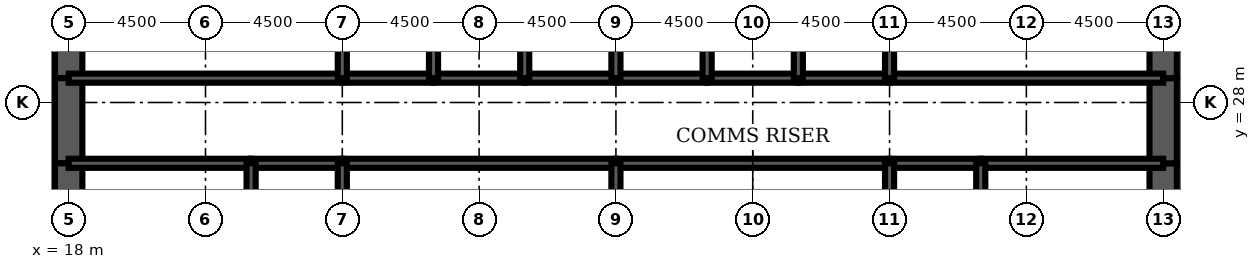
"""IFC4 building model, lengths in metres.
Left out: names, types, materials, properties, quantities, classifications, styles, units other than length and angle.
Written with IfcOpenShell. Run it as: python <this file> out.ifc"""

import sys

from ifc_helpers import new_model, si_unit, direction, frame, frame_2d, origin, place, context, subcontext, project, spatial, rectangle, extrude, element, fill, save


model = new_model("IFC4")
c1 = context("Model", 3, precision=1e-05, world=origin(), true_north=direction((0.0, 1.0)))
c2 = subcontext(c1, "Body", "Model", "MODEL_VIEW")
j1 = project(units=[si_unit("LENGTHUNIT", "METRE"), si_unit("PLANEANGLEUNIT", "RADIAN")], contexts=[c1])
p1 = place(None, origin())
s1 = spatial("IfcSite", under=j1, at=p1, CompositionType="ELEMENT")
p2 = place(p1, origin())
s2 = spatial("IfcBuilding", under=s1, at=p2, CompositionType="ELEMENT")
p3 = place(p2, frame((0.0, 0.0, 138.3)))
s3 = spatial("IfcBuildingStorey", under=s2, at=p3, CompositionType="ELEMENT", Elevation=138.3)
p4 = place(p3, frame((18.0, 32.0, 0.0), z_axis=(0.0, 0.0, 1.0), x_axis=(0.0, -1.0, 0.0)))
e1 = element("IfcWall", 1, at=p4, inside=s3, PredefinedType="SHEAR", context=c2, shape_type="SweptSolid", body=[
    extrude(rectangle(XDim=3.2, YDim=0.9, at=frame_2d((1.6, 0.0))), origin(), (0.0, 0.0, 1.0), 4.2),
])
p5 = place(p3, frame((18.0, 28.8, 0.0), z_axis=(0.0, 0.0, 1.0), x_axis=(0.0, -1.0, 0.0)))
e2 = element("IfcWall", 2, at=p5, inside=s3, PredefinedType="SHEAR", context=c2, shape_type="SweptSolid", body=[
    extrude(rectangle(XDim=2.8, YDim=0.9, at=frame_2d((1.4, 0.0))), origin(), (0.0, 0.0, 1.0), 4.2),
])
p6 = place(p5, frame((0.4, 0.0, 0.0)))
e3 = element("IfcOpeningElement", 3, at=p6, cuts=e2, PredefinedType="OPENING", context=c2, shape_type="SweptSolid", body=[
    extrude(rectangle(XDim=1.8, YDim=2.1, at=frame_2d((0.9, 1.05))), frame((0.0, 0.46, 0.0), z_axis=(0.0, -1.0, 0.0), x_axis=(1.0, 0.0, 0.0)), (0.0, 0.0, 1.0), 0.92),
])
for number, where, z_axis, x_axis in (
    (4, (18.0, 26.0, 0.0), (0.0, 0.0, 1.0), (0.0, -1.0, 0.0)),
    (5, (54.0, 22.0, 0.0), (0.0, 0.0, 1.0), (0.0, 1.0, 0.0)),
):
    element("IfcWall", number, at=place(p3, frame(where, z_axis=z_axis, x_axis=x_axis)), inside=s3, PredefinedType="SHEAR", context=c2, shape_type="SweptSolid", body=[
        extrude(rectangle(XDim=4.0, YDim=0.9, at=frame_2d((2.0, 0.0))), origin(), (0.0, 0.0, 1.0), 4.2),
    ])
p7 = place(p3, frame((54.0, 26.0, 0.0), z_axis=(0.0, 0.0, 1.0), x_axis=(0.0, 1.0, 0.0)))
e6 = element("IfcWall", 6, at=p7, inside=s3, PredefinedType="SHEAR", context=c2, shape_type="SweptSolid", body=[
    extrude(rectangle(XDim=2.8, YDim=0.9, at=frame_2d((1.4, 0.0))), origin(), (0.0, 0.0, 1.0), 4.2),
])
p8 = place(p7, frame((0.6, 0.0, 0.0)))
e7 = element("IfcOpeningElement", 7, at=p8, cuts=e6, PredefinedType="OPENING", context=c2, shape_type="SweptSolid", body=[
    extrude(rectangle(XDim=1.8, YDim=2.1, at=frame_2d((0.9, 1.05))), frame((0.0, 0.46, 0.0), z_axis=(0.0, -1.0, 0.0), x_axis=(1.0, 0.0, 0.0)), (0.0, 0.0, 1.0), 0.92),
])
p9 = place(p3, frame((54.0, 28.8, 0.0), z_axis=(0.0, 0.0, 1.0), x_axis=(0.0, 1.0, 0.0)))
e8 = element("IfcWall", 8, at=p9, inside=s3, PredefinedType="SHEAR", context=c2, shape_type="SweptSolid", body=[
    extrude(rectangle(XDim=3.2, YDim=0.9, at=frame_2d((1.6, 0.0))), origin(), (0.0, 0.0, 1.0), 4.2),
])
p10 = place(p3, frame((18.0, 28.8, 0.0), z_axis=(0.0, 0.0, 1.0), x_axis=(1.0, 0.0, 0.0)))
e9 = element("IfcWall", 9, at=p10, inside=s3, PredefinedType="SOLIDWALL", context=c2, shape_type="SweptSolid", body=[
    extrude(rectangle(XDim=9.0, YDim=0.3, at=frame_2d((4.5, 0.0))), origin(), (0.0, 0.0, 1.0), 4.2),
])
p11 = place(p10, frame((0.65, 0.0, 0.0)))
e10 = element("IfcOpeningElement", 10, at=p11, cuts=e9, PredefinedType="OPENING", context=c2, shape_type="SweptSolid", body=[
    extrude(rectangle(XDim=1.0, YDim=2.1, at=frame_2d((0.5, 1.05))), frame((0.0, 0.16, 0.0), z_axis=(0.0, -1.0, 0.0), x_axis=(1.0, 0.0, 0.0)), (0.0, 0.0, 1.0), 0.32),
])
p12 = place(p3, frame((27.0, 28.8, 0.0), z_axis=(0.0, 0.0, 1.0), x_axis=(1.0, 0.0, 0.0)))
e11 = element("IfcWall", 11, at=p12, inside=s3, PredefinedType="SOLIDWALL", context=c2, shape_type="SweptSolid", body=[
    extrude(rectangle(XDim=3.0, YDim=0.3, at=frame_2d((1.5, 0.0))), origin(), (0.0, 0.0, 1.0), 4.2),
])
p13 = place(p12, frame((0.95, 0.0, 0.0)))
e12 = element("IfcOpeningElement", 12, at=p13, cuts=e11, PredefinedType="OPENING", context=c2, shape_type="SweptSolid", body=[
    extrude(rectangle(XDim=1.1, YDim=2.2, at=frame_2d((0.55, 1.1))), frame((0.0, 0.16, 0.0), z_axis=(0.0, -1.0, 0.0), x_axis=(1.0, 0.0, 0.0)), (0.0, 0.0, 1.0), 0.32),
])
p14 = place(p3, frame((30.0, 28.8, 0.0), z_axis=(0.0, 0.0, 1.0), x_axis=(1.0, 0.0, 0.0)))
e13 = element("IfcWall", 13, at=p14, inside=s3, PredefinedType="SOLIDWALL", context=c2, shape_type="SweptSolid", body=[
    extrude(rectangle(XDim=3.0, YDim=0.3, at=frame_2d((1.5, 0.0))), origin(), (0.0, 0.0, 1.0), 4.2),
])
p15 = place(p14, frame((0.95, 0.0, 0.0)))
e14 = element("IfcOpeningElement", 14, at=p15, cuts=e13, PredefinedType="OPENING", context=c2, shape_type="SweptSolid", body=[
    extrude(rectangle(XDim=1.1, YDim=2.2, at=frame_2d((0.55, 1.1))), frame((0.0, 0.16, 0.0), z_axis=(0.0, -1.0, 0.0), x_axis=(1.0, 0.0, 0.0)), (0.0, 0.0, 1.0), 0.32),
])
p16 = place(p3, frame((33.0, 28.8, 0.0), z_axis=(0.0, 0.0, 1.0), x_axis=(1.0, 0.0, 0.0)))
e15 = element("IfcWall", 15, at=p16, inside=s3, PredefinedType="SOLIDWALL", context=c2, shape_type="SweptSolid", body=[
    extrude(rectangle(XDim=3.0, YDim=0.3, at=frame_2d((1.5, 0.0))), origin(), (0.0, 0.0, 1.0), 4.2),
])
p17 = place(p16, frame((0.95, 0.0, 0.0)))
e16 = element("IfcOpeningElement", 16, at=p17, cuts=e15, PredefinedType="OPENING", context=c2, shape_type="SweptSolid", body=[
    extrude(rectangle(XDim=1.1, YDim=2.2, at=frame_2d((0.55, 1.1))), frame((0.0, 0.16, 0.0), z_axis=(0.0, -1.0, 0.0), x_axis=(1.0, 0.0, 0.0)), (0.0, 0.0, 1.0), 0.32),
])
for number, where, z_axis, x_axis in (
    (17, (36.0, 28.8, 0.0), (0.0, 0.0, 1.0), (1.0, 0.0, 0.0)),
    (18, (39.0, 28.8, 0.0), (0.0, 0.0, 1.0), (1.0, 0.0, 0.0)),
):
    element("IfcWall", number, at=place(p3, frame(where, z_axis=z_axis, x_axis=x_axis)), inside=s3, PredefinedType="SOLIDWALL", context=c2, shape_type="SweptSolid", body=[
        extrude(rectangle(XDim=3.0, YDim=0.3, at=frame_2d((1.5, 0.0))), origin(), (0.0, 0.0, 1.0), 4.2),
    ])
p18 = place(p3, frame((42.0, 28.8, 0.0), z_axis=(0.0, 0.0, 1.0), x_axis=(1.0, 0.0, 0.0)))
e19 = element("IfcWall", 19, at=p18, inside=s3, PredefinedType="SOLIDWALL", context=c2, shape_type="SweptSolid", body=[
    extrude(rectangle(XDim=3.0, YDim=0.3, at=frame_2d((1.5, 0.0))), origin(), (0.0, 0.0, 1.0), 4.2),
])
p19 = place(p18, frame((0.95, 0.0, 0.0)))
e20 = element("IfcOpeningElement", 20, at=p19, cuts=e19, PredefinedType="OPENING", context=c2, shape_type="SweptSolid", body=[
    extrude(rectangle(XDim=1.1, YDim=2.2, at=frame_2d((0.55, 1.1))), frame((0.0, 0.16, 0.0), z_axis=(0.0, -1.0, 0.0), x_axis=(1.0, 0.0, 0.0)), (0.0, 0.0, 1.0), 0.32),
])
p20 = place(p3, frame((45.0, 28.8, 0.0), z_axis=(0.0, 0.0, 1.0), x_axis=(1.0, 0.0, 0.0)))
e21 = element("IfcWall", 21, at=p20, inside=s3, PredefinedType="SOLIDWALL", context=c2, shape_type="SweptSolid", body=[
    extrude(rectangle(XDim=9.0, YDim=0.3, at=frame_2d((4.5, 0.0))), origin(), (0.0, 0.0, 1.0), 4.2),
])
p21 = place(p20, frame((7.35, 0.0, 0.0)))
e22 = element("IfcOpeningElement", 22, at=p21, cuts=e21, PredefinedType="OPENING", context=c2, shape_type="SweptSolid", body=[
    extrude(rectangle(XDim=1.0, YDim=2.1, at=frame_2d((0.5, 1.05))), frame((0.0, 0.16, 0.0), z_axis=(0.0, -1.0, 0.0), x_axis=(1.0, 0.0, 0.0)), (0.0, 0.0, 1.0), 0.32),
])
p22 = place(p3, frame((18.0, 26.0, 0.0), z_axis=(0.0, 0.0, 1.0), x_axis=(1.0, 0.0, 0.0)))
e23 = element("IfcWall", 23, at=p22, inside=s3, PredefinedType="SOLIDWALL", context=c2, shape_type="SweptSolid", body=[
    extrude(rectangle(XDim=6.0, YDim=0.3, at=frame_2d((3.0, 0.0))), origin(), (0.0, 0.0, 1.0), 4.2),
])
p23 = place(p3, frame((24.0, 26.0, 0.0), z_axis=(0.0, 0.0, 1.0), x_axis=(1.0, 0.0, 0.0)))
e24 = element("IfcWall", 24, at=p23, inside=s3, PredefinedType="SOLIDWALL", context=c2, shape_type="SweptSolid", body=[
    extrude(rectangle(XDim=3.0, YDim=0.3, at=frame_2d((1.5, 0.0))), origin(), (0.0, 0.0, 1.0), 4.2),
])
for number, where, z_axis, x_axis in (
    (25, (27.0, 26.0, 0.0), (0.0, 0.0, 1.0), (1.0, 0.0, 0.0)),
    (26, (36.0, 26.0, 0.0), (0.0, 0.0, 1.0), (1.0, 0.0, 0.0)),
):
    element("IfcWall", number, at=place(p3, frame(where, z_axis=z_axis, x_axis=x_axis)), inside=s3, PredefinedType="SOLIDWALL", context=c2, shape_type="SweptSolid", body=[
        extrude(rectangle(XDim=9.0, YDim=0.3, at=frame_2d((4.5, 0.0))), origin(), (0.0, 0.0, 1.0), 4.2),
    ])
p24 = place(p3, frame((45.0, 26.0, 0.0), z_axis=(0.0, 0.0, 1.0), x_axis=(1.0, 0.0, 0.0)))
e27 = element("IfcWall", 27, at=p24, inside=s3, PredefinedType="SOLIDWALL", context=c2, shape_type="SweptSolid", body=[
    extrude(rectangle(XDim=3.0, YDim=0.3, at=frame_2d((1.5, 0.0))), origin(), (0.0, 0.0, 1.0), 4.2),
])
p25 = place(p3, frame((48.0, 26.0, 0.0), z_axis=(0.0, 0.0, 1.0), x_axis=(1.0, 0.0, 0.0)))
e28 = element("IfcWall", 28, at=p25, inside=s3, PredefinedType="SOLIDWALL", context=c2, shape_type="SweptSolid", body=[
    extrude(rectangle(XDim=6.0, YDim=0.3, at=frame_2d((3.0, 0.0))), origin(), (0.0, 0.0, 1.0), 4.2),
])
for number, where, z_axis, x_axis in (
    (29, (27.0, 28.8, 0.0), (0.0, 0.0, 1.0), (0.0, 1.0, 0.0)),
    (30, (30.0, 28.8, 0.0), (0.0, 0.0, 1.0), (0.0, 1.0, 0.0)),
    (31, (33.0, 28.8, 0.0), (0.0, 0.0, 1.0), (0.0, 1.0, 0.0)),
    (32, (36.0, 28.8, 0.0), (0.0, 0.0, 1.0), (0.0, 1.0, 0.0)),
    (33, (39.0, 28.8, 0.0), (0.0, 0.0, 1.0), (0.0, 1.0, 0.0)),
    (34, (42.0, 28.8, 0.0), (0.0, 0.0, 1.0), (0.0, 1.0, 0.0)),
    (35, (45.0, 28.8, 0.0), (0.0, 0.0, 1.0), (0.0, 1.0, 0.0)),
):
    element("IfcWall", number, at=place(p3, frame(where, z_axis=z_axis, x_axis=x_axis)), inside=s3, PredefinedType="SOLIDWALL", context=c2, shape_type="SweptSolid", body=[
        extrude(rectangle(XDim=3.2, YDim=0.3, at=frame_2d((1.6, 0.0))), origin(), (0.0, 0.0, 1.0), 4.2),
    ])
for number, where, z_axis, x_axis in (
    (36, (24.0, 22.0, 0.0), (0.0, 0.0, 1.0), (0.0, 1.0, 0.0)),
    (37, (27.0, 22.0, 0.0), (0.0, 0.0, 1.0), (0.0, 1.0, 0.0)),
    (38, (36.0, 22.0, 0.0), (0.0, 0.0, 1.0), (0.0, 1.0, 0.0)),
    (39, (45.0, 22.0, 0.0), (0.0, 0.0, 1.0), (0.0, 1.0, 0.0)),
    (40, (48.0, 22.0, 0.0), (0.0, 0.0, 1.0), (0.0, 1.0, 0.0)),
):
    element("IfcWall", number, at=place(p3, frame(where, z_axis=z_axis, x_axis=x_axis)), inside=s3, PredefinedType="SOLIDWALL", context=c2, shape_type="SweptSolid", body=[
        extrude(rectangle(XDim=4.0, YDim=0.3, at=frame_2d((2.0, 0.0))), origin(), (0.0, 0.0, 1.0), 4.2),
    ])
p26 = place(p3, frame((39.0, 22.15, 0.0), z_axis=(0.0, 0.0, 1.0), x_axis=(0.0, 1.0, 0.0)))
e41 = element("IfcWall", 41, at=p26, inside=s3, PredefinedType="PARTITIONING", context=c2, shape_type="SweptSolid", body=[
    extrude(rectangle(XDim=3.7, YDim=0.15, at=frame_2d((1.85, 0.0))), origin(), (0.0, 0.0, 1.0), 3.0),
])
p27 = place(p26, frame((2.2, 0.0, 0.0)))
e42 = element("IfcOpeningElement", 42, at=p27, cuts=e41, PredefinedType="OPENING", context=c2, shape_type="SweptSolid", body=[
    extrude(rectangle(XDim=1.0, YDim=2.1, at=frame_2d((0.5, 1.05))), frame((0.0, 0.085, 0.0), z_axis=(0.0, -1.0, 0.0), x_axis=(1.0, 0.0, 0.0)), (0.0, 0.0, 1.0), 0.17),
])
for number, where, z_axis, x_axis in (
    (43, (20.625, 22.15, 0.0), (0.0, 0.0, 1.0), (0.0, 1.0, 0.0)),
    (44, (51.375, 22.15, 0.0), (0.0, 0.0, 1.0), (0.0, 1.0, 0.0)),
):
    element("IfcWall", number, at=place(p3, frame(where, z_axis=z_axis, x_axis=x_axis)), inside=s3, PredefinedType="PARTITIONING", context=c2, shape_type="SweptSolid", body=[
        extrude(rectangle(XDim=3.7, YDim=0.15, at=frame_2d((1.85, 0.0))), origin(), (0.0, 0.0, 1.0), 3.0),
    ])
p28 = place(p27, origin())
e45 = element("IfcDoor", 45, at=p28, inside=s3, OperationType="SINGLE_SWING_RIGHT", PredefinedType="DOOR", context=c2, shape_type="SweptSolid", body=[
    extrude(rectangle(XDim=1.0, YDim=2.1, at=frame_2d((0.5, 1.05))), frame((0.0, 0.025, 0.0), z_axis=(0.0, -1.0, 0.0), x_axis=(1.0, 0.0, 0.0)), (0.0, 0.0, 1.0), 0.05),
])
fill(e42, e45)
p29 = place(p19, origin())
e46 = element("IfcDoor", 46, at=p29, inside=s3, OperationType="DOUBLE_DOOR_SLIDING", PredefinedType="USERDEFINED", context=c2, shape_type="SweptSolid", body=[
    extrude(rectangle(XDim=1.1, YDim=2.2, at=frame_2d((0.55, 1.1))), frame((0.0, 0.025, 0.0), z_axis=(0.0, -1.0, 0.0), x_axis=(1.0, 0.0, 0.0)), (0.0, 0.0, 1.0), 0.05),
])
fill(e20, e46)
p30 = place(p13, origin())
e47 = element("IfcDoor", 47, at=p30, inside=s3, OperationType="DOUBLE_DOOR_SLIDING", PredefinedType="USERDEFINED", context=c2, shape_type="SweptSolid", body=[
    extrude(rectangle(XDim=1.1, YDim=2.2, at=frame_2d((0.55, 1.1))), frame((0.0, 0.025, 0.0), z_axis=(0.0, -1.0, 0.0), x_axis=(1.0, 0.0, 0.0)), (0.0, 0.0, 1.0), 0.05),
])
fill(e12, e47)
p31 = place(p15, origin())
e48 = element("IfcDoor", 48, at=p31, inside=s3, OperationType="DOUBLE_DOOR_SLIDING", PredefinedType="USERDEFINED", context=c2, shape_type="SweptSolid", body=[
    extrude(rectangle(XDim=1.1, YDim=2.2, at=frame_2d((0.55, 1.1))), frame((0.0, 0.025, 0.0), z_axis=(0.0, -1.0, 0.0), x_axis=(1.0, 0.0, 0.0)), (0.0, 0.0, 1.0), 0.05),
])
fill(e14, e48)
p32 = place(p17, origin())
e49 = element("IfcDoor", 49, at=p32, inside=s3, OperationType="DOUBLE_DOOR_SLIDING", PredefinedType="USERDEFINED", context=c2, shape_type="SweptSolid", body=[
    extrude(rectangle(XDim=1.1, YDim=2.2, at=frame_2d((0.55, 1.1))), frame((0.0, 0.025, 0.0), z_axis=(0.0, -1.0, 0.0), x_axis=(1.0, 0.0, 0.0)), (0.0, 0.0, 1.0), 0.05),
])
fill(e16, e49)
p33 = place(p11, origin())
e50 = element("IfcDoor", 50, at=p33, inside=s3, OperationType="SINGLE_SWING_LEFT", PredefinedType="DOOR", context=c2, shape_type="SweptSolid", body=[
    extrude(rectangle(XDim=1.0, YDim=2.1, at=frame_2d((0.5, 1.05))), frame((0.0, 0.025, 0.0), z_axis=(0.0, -1.0, 0.0), x_axis=(1.0, 0.0, 0.0)), (0.0, 0.0, 1.0), 0.05),
])
fill(e10, e50)
p34 = place(p21, origin())
e51 = element("IfcDoor", 51, at=p34, inside=s3, OperationType="SINGLE_SWING_RIGHT", PredefinedType="DOOR", context=c2, shape_type="SweptSolid", body=[
    extrude(rectangle(XDim=1.0, YDim=2.1, at=frame_2d((0.5, 1.05))), frame((0.0, 0.025, 0.0), z_axis=(0.0, -1.0, 0.0), x_axis=(1.0, 0.0, 0.0)), (0.0, 0.0, 1.0), 0.05),
])
fill(e22, e51)
p35 = place(p6, origin())
e52 = element("IfcDoor", 52, at=p35, inside=s3, OperationType="SINGLE_SWING_LEFT", PredefinedType="DOOR", context=c2, shape_type="SweptSolid", body=[
    extrude(rectangle(XDim=1.8, YDim=2.1, at=frame_2d((0.9, 1.05))), frame((0.0, 0.45, 0.0), z_axis=(0.0, -1.0, 0.0), x_axis=(1.0, 0.0, 0.0)), (0.0, 0.0, 1.0), 0.899),
])
fill(e3, e52)
p36 = place(p8, origin())
e53 = element("IfcDoor", 53, at=p36, inside=s3, OperationType="SINGLE_SWING_LEFT", PredefinedType="DOOR", context=c2, shape_type="SweptSolid", body=[
    extrude(rectangle(XDim=1.8, YDim=2.1, at=frame_2d((0.9, 1.05))), frame((0.0, 0.45, 0.0), z_axis=(0.0, -1.0, 0.0), x_axis=(1.0, 0.0, 0.0)), (0.0, 0.0, 1.0), 0.899),
])
fill(e7, e53)
save(model, sys.argv[1])
